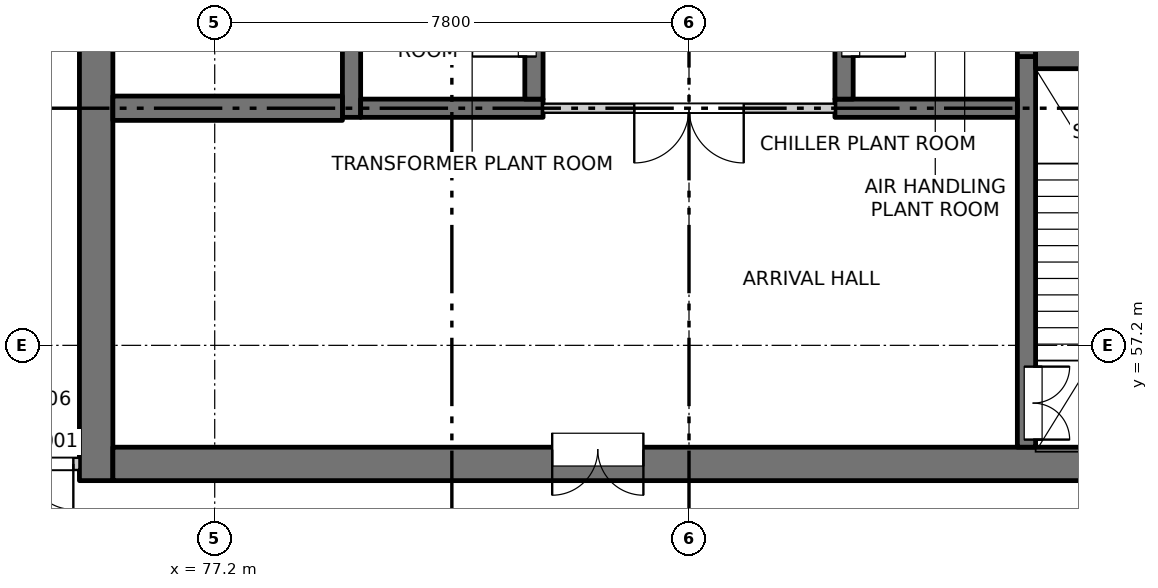
"""IFC4 building model, lengths in metres.
Left out: names, types, materials, properties, quantities, classifications, styles, units other than length and angle.
Written with IfcOpenShell. Run it as: python <this file> out.ifc"""

import sys

from ifc_helpers import new_model, si_unit, direction, frame, frame_2d, origin, place, context, subcontext, project, spatial, rectangle, extrude, element, fill, save


model = new_model("IFC4")
c1 = context("Model", 3, precision=1e-05, world=origin(), true_north=direction((0.0, 1.0)))
c2 = subcontext(c1, "Body", "Model", "MODEL_VIEW")
j1 = project(units=[si_unit("LENGTHUNIT", "METRE"), si_unit("PLANEANGLEUNIT", "RADIAN")], contexts=[c1])
p1 = place(None, origin())
s1 = spatial("IfcSite", under=j1, at=p1, CompositionType="ELEMENT")
p2 = place(p1, origin())
s2 = spatial("IfcBuilding", under=s1, at=p2, CompositionType="ELEMENT")
p3 = place(p2, frame((0.0, 0.0, 192.8)))
s3 = spatial("IfcBuildingStorey", under=s2, at=p3, CompositionType="ELEMENT", Elevation=192.8)
p4 = place(p3, frame((75.25, 54.975, -0.3), z_axis=(0.0, 0.0, 1.0), x_axis=(0.0, 1.0, 0.0)))
e1 = element("IfcWall", 1, at=p4, inside=s3, PredefinedType="SOLIDWALL", context=c2, shape_type="SweptSolid", body=[
    extrude(rectangle(XDim=22.325, YDim=0.55, at=frame_2d((11.163, 0.0))), origin(), (0.0, 0.0, 1.0), 4.5),
])
p5 = place(p4, frame((7.475, 0.0, 0.3)))
e2 = element("IfcOpeningElement", 2, at=p5, cuts=e1, PredefinedType="OPENING", context=c2, shape_type="SweptSolid", body=[
    extrude(rectangle(XDim=0.9, YDim=2.1, at=frame_2d((0.45, 1.05))), frame((0.0, 0.285, 0.0), z_axis=(0.0, -1.0, 0.0), x_axis=(1.0, 0.0, 0.0)), (0.0, 0.0, 1.0), 0.57),
])
p6 = place(p4, frame((12.125, 0.0, 0.3)))
e3 = element("IfcOpeningElement", 3, at=p6, cuts=e1, PredefinedType="OPENING", context=c2, shape_type="SweptSolid", body=[
    extrude(rectangle(XDim=0.9, YDim=2.1, at=frame_2d((0.45, 1.05))), frame((0.0, 0.285, 0.0), z_axis=(0.0, -1.0, 0.0), x_axis=(1.0, 0.0, 0.0)), (0.0, 0.0, 1.0), 0.57),
])
p7 = place(p4, frame((16.625, 0.0, 0.3)))
e4 = element("IfcOpeningElement", 4, at=p7, cuts=e1, PredefinedType="OPENING", context=c2, shape_type="SweptSolid", body=[
    extrude(rectangle(XDim=0.9, YDim=2.1, at=frame_2d((0.45, 1.05))), frame((0.0, 0.285, 0.0), z_axis=(0.0, -1.0, 0.0), x_axis=(1.0, 0.0, 0.0)), (0.0, 0.0, 1.0), 0.57),
])
p8 = place(p4, frame((20.075, 0.0, 0.3)))
e5 = element("IfcOpeningElement", 5, at=p8, cuts=e1, PredefinedType="OPENING", context=c2, shape_type="SweptSolid", body=[
    extrude(rectangle(XDim=0.9, YDim=2.1, at=frame_2d((0.45, 1.05))), frame((0.0, 0.285, 0.0), z_axis=(0.0, -1.0, 0.0), x_axis=(1.0, 0.0, 0.0)), (0.0, 0.0, 1.0), 0.57),
])
p9 = place(p3, frame((75.525, 55.25, -0.3), z_axis=(0.0, 0.0, 1.0), x_axis=(1.0, 0.0, 0.0)))
e6 = element("IfcWall", 6, at=p9, inside=s3, PredefinedType="SOLIDWALL", context=c2, shape_type="SweptSolid", body=[
    extrude(rectangle(XDim=18.95, YDim=0.55, at=frame_2d((9.475, 0.0))), origin(), (0.0, 0.0, 1.0), 4.5),
])
p10 = place(p9, frame((7.225, 0.0, 0.3)))
e7 = element("IfcOpeningElement", 7, at=p10, cuts=e6, PredefinedType="OPENING", context=c2, shape_type="SweptSolid", body=[
    extrude(rectangle(XDim=1.5, YDim=2.1, at=frame_2d((0.75, 1.05))), frame((0.0, 0.285, 0.0), z_axis=(0.0, -1.0, 0.0), x_axis=(1.0, 0.0, 0.0)), (0.0, 0.0, 1.0), 0.57),
])
p11 = place(p3, frame((79.45, 60.95, -0.3), z_axis=(0.0, 0.0, 1.0), x_axis=(0.0, 1.0, 0.0)))
e8 = element("IfcWall", 8, at=p11, inside=s3, PredefinedType="SOLIDWALL", context=c2, shape_type="SweptSolid", body=[
    extrude(rectangle(XDim=16.35, YDim=0.3, at=frame_2d((8.175, 0.0))), origin(), (0.0, 0.0, 1.0), 4.5),
])
p12 = place(p3, frame((90.55, 55.525, -0.3), z_axis=(0.0, 0.0, 1.0), x_axis=(0.0, 1.0, 0.0)))
e9 = element("IfcWall", 9, at=p12, inside=s3, PredefinedType="SOLIDWALL", context=c2, shape_type="SweptSolid", body=[
    extrude(rectangle(XDim=6.425, YDim=0.3, at=frame_2d((3.212, 0.0))), origin(), (0.0, 0.0, 1.0), 4.5),
])
p13 = place(p12, frame((0.125, 0.0, 0.3)))
e10 = element("IfcOpeningElement", 10, at=p13, cuts=e9, PredefinedType="OPENING", context=c2, shape_type="SweptSolid", body=[
    extrude(rectangle(XDim=1.2, YDim=2.1, at=frame_2d((0.6, 1.05))), frame((0.0, 0.16, 0.0), z_axis=(0.0, -1.0, 0.0), x_axis=(1.0, 0.0, 0.0)), (0.0, 0.0, 1.0), 0.32),
])
p14 = place(p3, frame((90.55, 61.95, -0.3), z_axis=(0.0, 0.0, 1.0), x_axis=(0.0, 1.0, 0.0)))
e11 = element("IfcWall", 11, at=p14, inside=s3, PredefinedType="SOLIDWALL", context=c2, shape_type="SweptSolid", body=[
    extrude(rectangle(XDim=15.35, YDim=0.3, at=frame_2d((7.675, 0.0))), origin(), (0.0, 0.0, 1.0), 4.5),
])
p15 = place(p3, frame((79.6, 61.1, -0.3), z_axis=(0.0, 0.0, 1.0), x_axis=(1.0, 0.0, 0.0)))
e12 = element("IfcWall", 12, at=p15, inside=s3, PredefinedType="SOLIDWALL", context=c2, shape_type="SweptSolid", body=[
    extrude(rectangle(XDim=3.0, YDim=0.3, at=frame_2d((1.5, 0.0))), origin(), (0.0, 0.0, 1.0), 4.5),
])
p16 = place(p3, frame((82.45, 61.25, -0.3), z_axis=(0.0, 0.0, 1.0), x_axis=(0.0, 1.0, 0.0)))
e13 = element("IfcWall", 13, at=p16, inside=s3, PredefinedType="SOLIDWALL", context=c2, shape_type="SweptSolid", body=[
    extrude(rectangle(XDim=2.3, YDim=0.3, at=frame_2d((1.15, 0.0))), origin(), (0.0, 0.0, 1.0), 4.5),
])
p17 = place(p16, frame((0.7, 0.0, 0.3)))
e14 = element("IfcOpeningElement", 14, at=p17, cuts=e13, PredefinedType="OPENING", context=c2, shape_type="SweptSolid", body=[
    extrude(rectangle(XDim=0.9, YDim=2.1, at=frame_2d((0.45, 1.05))), frame((0.0, 0.16, 0.0), z_axis=(0.0, -1.0, 0.0), x_axis=(1.0, 0.0, 0.0)), (0.0, 0.0, 1.0), 0.32),
])
p18 = place(p3, frame((87.4, 61.1, -0.3), z_axis=(0.0, 0.0, 1.0), x_axis=(1.0, 0.0, 0.0)))
e15 = element("IfcWall", 15, at=p18, inside=s3, PredefinedType="SOLIDWALL", context=c2, shape_type="SweptSolid", body=[
    extrude(rectangle(XDim=3.0, YDim=0.3, at=frame_2d((1.5, 0.0))), origin(), (0.0, 0.0, 1.0), 4.5),
])
p19 = place(p3, frame((87.55, 61.25, -0.3), z_axis=(0.0, 0.0, 1.0), x_axis=(0.0, 1.0, 0.0)))
e16 = element("IfcWall", 16, at=p19, inside=s3, PredefinedType="SOLIDWALL", context=c2, shape_type="SweptSolid", body=[
    extrude(rectangle(XDim=2.3, YDim=0.3, at=frame_2d((1.15, 0.0))), origin(), (0.0, 0.0, 1.0), 4.5),
])
p20 = place(p19, frame((0.7, 0.0, 0.3)))
e17 = element("IfcOpeningElement", 17, at=p20, cuts=e16, PredefinedType="OPENING", context=c2, shape_type="SweptSolid", body=[
    extrude(rectangle(XDim=0.9, YDim=2.1, at=frame_2d((0.45, 1.05))), frame((0.0, 0.16, 0.0), z_axis=(0.0, -1.0, 0.0), x_axis=(1.0, 0.0, 0.0)), (0.0, 0.0, 1.0), 0.32),
])
for number, where, z_axis, x_axis in (
    (18, (75.525, 61.1, -0.3), (0.0, 0.0, 1.0), (1.0, 0.0, 0.0)),
    (19, (90.7, 61.95, -0.3), (0.0, 0.0, 1.0), (1.0, 0.0, 0.0)),
):
    element("IfcWall", number, at=place(p3, frame(where, z_axis=z_axis, x_axis=x_axis)), inside=s3, PredefinedType="SOLIDWALL", context=c2, shape_type="SweptSolid", body=[
        extrude(rectangle(XDim=3.775, YDim=0.4, at=frame_2d((1.888, 0.0))), origin(), (0.0, 0.0, 1.0), 4.5),
    ])
p21 = place(p3, frame((73.2, 55.25, 0.0), z_axis=(0.0, 0.0, 1.0), x_axis=(1.0, 0.0, 0.0)))
e20 = element("IfcWall", 20, at=p21, inside=s3, PredefinedType="PARTITIONING", context=c2, shape_type="SweptSolid", body=[
    extrude(rectangle(XDim=1.775, YDim=0.2, at=frame_2d((0.887, 0.0))), origin(), (0.0, 0.0, 1.0), 4.2),
])
p22 = place(p21, frame((0.175, 0.0, 0.0)))
e21 = element("IfcOpeningElement", 21, at=p22, cuts=e20, PredefinedType="OPENING", context=c2, shape_type="SweptSolid", body=[
    extrude(rectangle(XDim=1.5, YDim=2.1, at=frame_2d((0.75, 1.05))), frame((0.0, 0.11, 0.0), z_axis=(0.0, -1.0, 0.0), x_axis=(1.0, 0.0, 0.0)), (0.0, 0.0, 1.0), 0.22),
])
p23 = place(p3, frame((82.6, 61.1, 0.0), z_axis=(0.0, 0.0, 1.0), x_axis=(1.0, 0.0, 0.0)))
e22 = element("IfcWall", 22, at=p23, inside=s3, PredefinedType="PARTITIONING", context=c2, shape_type="SweptSolid", body=[
    extrude(rectangle(XDim=4.8, YDim=0.15, at=frame_2d((2.4, 0.0))), origin(), (0.0, 0.0, 1.0), 4.2),
])
p24 = place(p23, frame((1.5, 0.0, 0.0)))
e23 = element("IfcOpeningElement", 23, at=p24, cuts=e22, PredefinedType="OPENING", context=c2, shape_type="SweptSolid", body=[
    extrude(rectangle(XDim=1.8, YDim=2.1, at=frame_2d((0.9, 1.05))), frame((0.0, 0.085, 0.0), z_axis=(0.0, -1.0, 0.0), x_axis=(1.0, 0.0, 0.0)), (0.0, 0.0, 1.0), 0.17),
])
p25 = place(p22, origin())
e24 = element("IfcDoor", 24, at=p25, inside=s3, OperationType="DOUBLE_DOOR_SINGLE_SWING", PredefinedType="DOOR", context=c2, shape_type="SweptSolid", body=[
    extrude(rectangle(XDim=1.5, YDim=2.1, at=frame_2d((0.75, 1.05))), frame((0.0, 0.025, 0.0), z_axis=(0.0, -1.0, 0.0), x_axis=(1.0, 0.0, 0.0)), (0.0, 0.0, 1.0), 0.05),
])
fill(e21, e24)
p26 = place(p10, origin())
e25 = element("IfcDoor", 25, at=p26, inside=s3, OperationType="DOUBLE_DOOR_SINGLE_SWING", PredefinedType="DOOR", context=c2, shape_type="SweptSolid", body=[
    extrude(rectangle(XDim=1.5, YDim=2.1, at=frame_2d((0.75, 1.05))), frame((0.0, 0.26, 0.0), z_axis=(0.0, -1.0, 0.0), x_axis=(1.0, 0.0, 0.0)), (0.0, 0.0, 1.0), 0.05),
])
fill(e7, e25)
p27 = place(p13, origin())
e26 = element("IfcDoor", 26, at=p27, inside=s3, OperationType="DOUBLE_DOOR_SINGLE_SWING", PredefinedType="DOOR", context=c2, shape_type="SweptSolid", body=[
    extrude(rectangle(XDim=1.2, YDim=2.1, at=frame_2d((0.6, 1.05))), frame((0.0, -0.085, 0.0), z_axis=(0.0, -1.0, 0.0), x_axis=(1.0, 0.0, 0.0)), (0.0, 0.0, 1.0), 0.05),
])
fill(e10, e26)
p28 = place(p24, origin())
e27 = element("IfcDoor", 27, at=p28, inside=s3, OperationType="DOUBLE_DOOR_SINGLE_SWING", PredefinedType="DOOR", context=c2, shape_type="SweptSolid", body=[
    extrude(rectangle(XDim=1.8, YDim=2.1, at=frame_2d((0.9, 1.05))), frame((0.0, 0.025, 0.0), z_axis=(0.0, -1.0, 0.0), x_axis=(1.0, 0.0, 0.0)), (0.0, 0.0, 1.0), 0.05),
])
fill(e23, e27)
p29 = place(p17, origin())
e28 = element("IfcDoor", 28, at=p29, inside=s3, OperationType="SINGLE_SWING_LEFT", PredefinedType="DOOR", context=c2, shape_type="SweptSolid", body=[
    extrude(rectangle(XDim=0.9, YDim=2.1, at=frame_2d((0.45, 1.05))), frame((0.0, 0.135, 0.0), z_axis=(0.0, -1.0, 0.0), x_axis=(1.0, 0.0, 0.0)), (0.0, 0.0, 1.0), 0.05),
])
fill(e14, e28)
p30 = place(p20, origin())
e29 = element("IfcDoor", 29, at=p30, inside=s3, OperationType="SINGLE_SWING_RIGHT", PredefinedType="DOOR", context=c2, shape_type="SweptSolid", body=[
    extrude(rectangle(XDim=0.9, YDim=2.1, at=frame_2d((0.45, 1.05))), frame((0.0, -0.085, 0.0), z_axis=(0.0, -1.0, 0.0), x_axis=(1.0, 0.0, 0.0)), (0.0, 0.0, 1.0), 0.05),
])
fill(e17, e29)
save(model, sys.argv[1])
